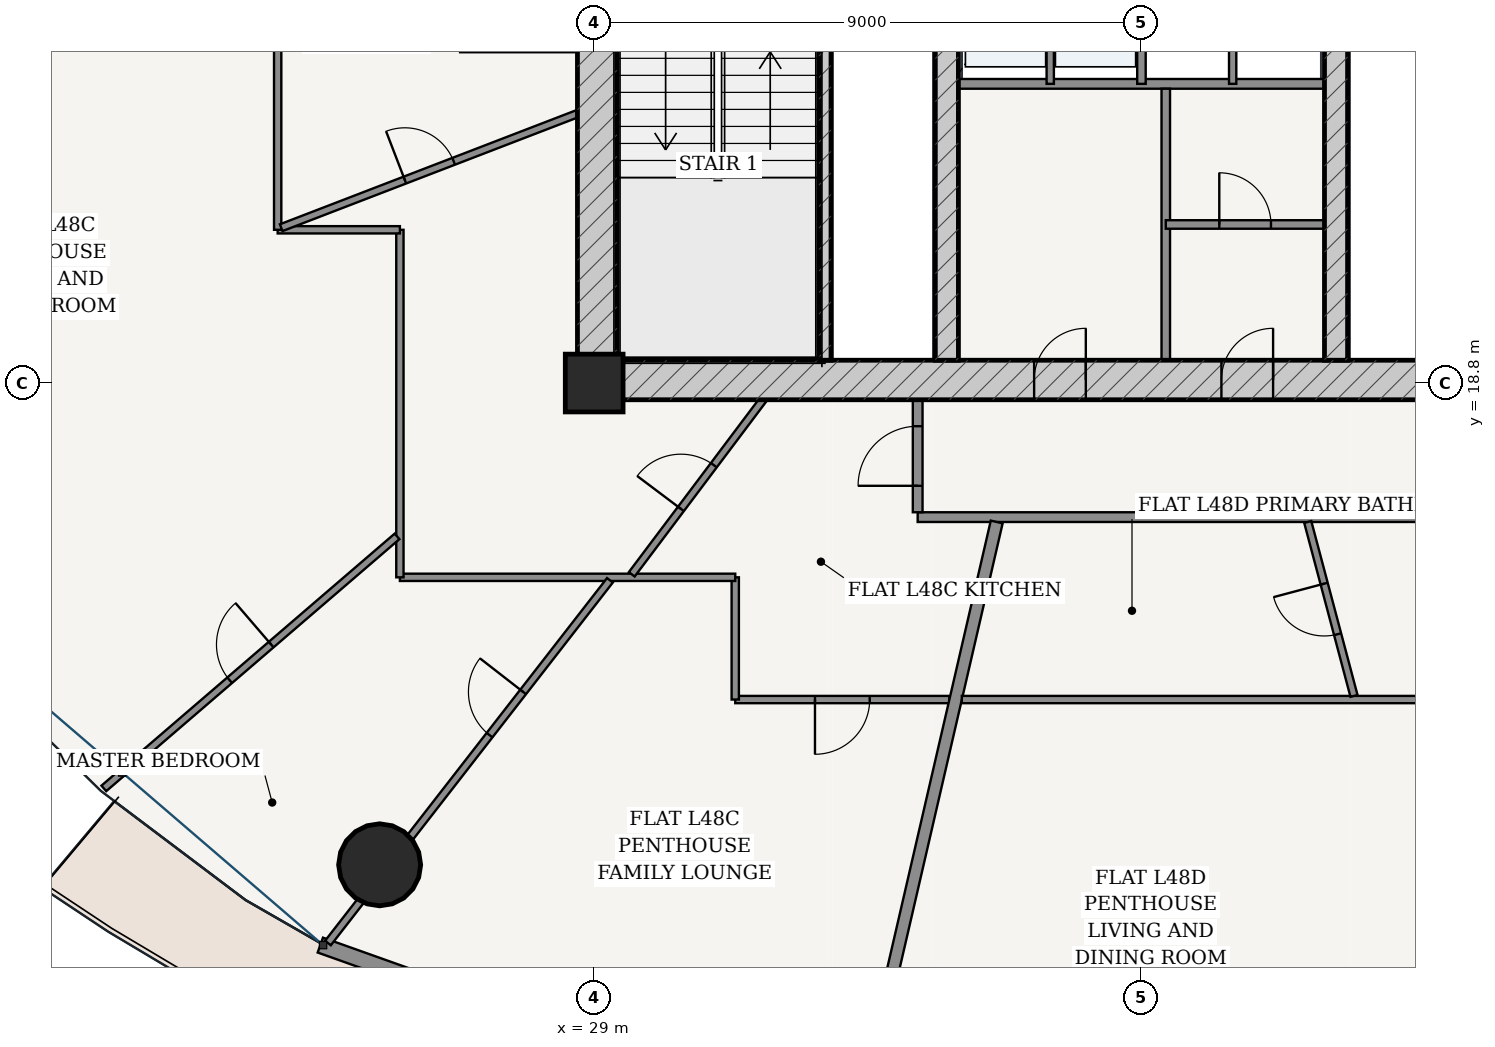
"""IFC4 building model, lengths in metres.
Left out: names, types, materials, properties, quantities, classifications, styles, units other than length and angle.
Written with IfcOpenShell. Run it as: python <this file> out.ifc"""

import sys

from ifc_helpers import new_model, si_unit, direction, frame, frame_2d, origin, origin_2d, place, context, subcontext, project, spatial, rectangle, hollow_circle, extrude, source, transform, mapped, element, fill, save


model = new_model("IFC4")
c1 = context("Model", 3, precision=1e-05, world=origin(), true_north=direction((-0.2419218956, 0.970295726276)))
c2 = subcontext(c1, "Body", "Model", "MODEL_VIEW")
j1 = project(units=[si_unit("LENGTHUNIT", "METRE"), si_unit("PLANEANGLEUNIT", "RADIAN")], contexts=[c1])
p1 = place(None, origin())
s1 = spatial("IfcSite", under=j1, at=p1, CompositionType="ELEMENT")
p2 = place(p1, origin())
s2 = spatial("IfcBuilding", under=s1, at=p2, CompositionType="ELEMENT")
p3 = place(p2, frame((0.0, 0.0, 182.2)))
s3 = spatial("IfcBuildingStorey", under=s2, at=p3, CompositionType="ELEMENT", Elevation=182.2)
p4 = place(p3, frame((29.0, 18.8, 0.0), z_axis=(0.0, 0.0, 1.0), x_axis=(1.0, 0.0, 0.0)))
e1 = element("IfcColumn", 1, at=p4, inside=s3, PredefinedType="COLUMN", context=c2, shape_type="SweptSolid", body=[
    extrude(rectangle(XDim=0.95, YDim=0.95, at=origin_2d()), origin(), (0.0, 0.0, 1.0), 3.6),
])
p5 = place(p3, frame((28.725, 18.85, 0.0), z_axis=(0.0, 0.0, 1.0), x_axis=(1.0, 0.0, 0.0)))
e2 = element("IfcWall", 2, at=p5, inside=s3, PredefinedType="SHEAR", context=c2, shape_type="SweptSolid", body=[
    extrude(rectangle(XDim=18.55, YDim=0.65, at=frame_2d((9.275, 0.0))), origin(), (0.0, 0.0, 1.0), 3.15),
])
p6 = place(p5, frame((7.51, 0.0, 0.0)))
e3 = element("IfcOpeningElement", 3, at=p6, cuts=e2, PredefinedType="OPENING", context=c2, shape_type="SweptSolid", body=[
    extrude(rectangle(XDim=0.85, YDim=2.1, at=frame_2d((0.425, 1.05))), frame((0.0, 0.335, 0.0), z_axis=(0.0, -1.0, 0.0), x_axis=(1.0, 0.0, 0.0)), (0.0, 0.0, 1.0), 0.67),
])
p7 = place(p5, frame((10.59, 0.0, 0.0)))
e4 = element("IfcOpeningElement", 4, at=p7, cuts=e2, PredefinedType="OPENING", context=c2, shape_type="SweptSolid", body=[
    extrude(rectangle(XDim=0.85, YDim=2.1, at=frame_2d((0.425, 1.05))), frame((0.0, 0.335, 0.0), z_axis=(0.0, -1.0, 0.0), x_axis=(1.0, 0.0, 0.0)), (0.0, 0.0, 1.0), 0.67),
])
p8 = place(p3, frame((29.05, 19.175, 0.0), z_axis=(0.0, 0.0, 1.0), x_axis=(0.0, 1.0, 0.0)))
e5 = element("IfcWall", 5, at=p8, inside=s3, PredefinedType="SHEAR", context=c2, shape_type="SweptSolid", body=[
    extrude(rectangle(XDim=15.25, YDim=0.65, at=frame_2d((7.625, 0.0))), origin(), (0.0, 0.0, 1.0), 3.15),
])
p9 = place(p8, frame((9.875, 0.0, 0.0)))
e6 = element("IfcOpeningElement", 6, at=p9, cuts=e5, PredefinedType="OPENING", context=c2, shape_type="SweptSolid", body=[
    extrude(rectangle(XDim=1.5, YDim=2.2, at=frame_2d((0.75, 1.1))), frame((0.0, 0.335, 0.0), z_axis=(0.0, -1.0, 0.0), x_axis=(1.0, 0.0, 0.0)), (0.0, 0.0, 1.0), 0.67),
])
p10 = place(p3, frame((32.795, 19.175, 0.0), z_axis=(0.0, 0.0, 1.0), x_axis=(0.0, 1.0, 0.0)))
e7 = element("IfcWall", 7, at=p10, inside=s3, PredefinedType="SOLIDWALL", context=c2, shape_type="SweptSolid", body=[
    extrude(rectangle(XDim=7.375, YDim=0.2, at=frame_2d((3.688, 0.0))), origin(), (0.0, 0.0, 1.0), 3.15),
])
p11 = place(p3, frame((34.8, 19.175, 0.0), z_axis=(0.0, 0.0, 1.0), x_axis=(0.0, 1.0, 0.0)))
e8 = element("IfcWall", 8, at=p11, inside=s3, PredefinedType="SHEAR", context=c2, shape_type="SweptSolid", body=[
    extrude(rectangle(XDim=15.25, YDim=0.38, at=frame_2d((7.625, 0.0))), origin(), (0.0, 0.0, 1.0), 3.15),
])
p12 = place(p11, frame((7.8, 0.0, 0.0)))
e9 = element("IfcOpeningElement", 9, at=p12, cuts=e8, PredefinedType="OPENING", context=c2, shape_type="SweptSolid", body=[
    extrude(rectangle(XDim=1.05, YDim=2.15, at=frame_2d((0.525, 1.075))), frame((0.0, 0.2, 0.0), z_axis=(0.0, -1.0, 0.0), x_axis=(1.0, 0.0, 0.0)), (0.0, 0.0, 1.0), 0.4),
])
p13 = place(p3, frame((41.2, 19.175, 0.0), z_axis=(0.0, 0.0, 1.0), x_axis=(0.0, 1.0, 0.0)))
e10 = element("IfcWall", 10, at=p13, inside=s3, PredefinedType="SHEAR", context=c2, shape_type="SweptSolid", body=[
    extrude(rectangle(XDim=15.25, YDim=0.38, at=frame_2d((7.625, 0.0))), origin(), (0.0, 0.0, 1.0), 3.15),
])
p14 = place(p13, frame((7.8, 0.0, 0.0)))
e11 = element("IfcOpeningElement", 11, at=p14, cuts=e10, PredefinedType="OPENING", context=c2, shape_type="SweptSolid", body=[
    extrude(rectangle(XDim=1.05, YDim=2.15, at=frame_2d((0.525, 1.075))), frame((0.0, 0.2, 0.0), z_axis=(0.0, -1.0, 0.0), x_axis=(1.0, 0.0, 0.0)), (0.0, 0.0, 1.0), 0.4),
])
p15 = place(p3, frame((25.472, 10.877, 0.0), z_axis=(0.0, 0.0, 1.0), x_axis=(1.0, 0.0, 0.0)))
e12 = element("IfcColumn", 12, at=p15, inside=s3, PredefinedType="COLUMN", context=c2, shape_type="SweptSolid", body=[
    extrude(hollow_circle(Radius=0.675, WallThickness=0.042, at=origin_2d()), origin(), (0.0, 0.0, 1.0), 3.6),
])
p16 = place(p3, frame((24.497, 9.557, 0.0), z_axis=(0.0, 0.0, 1.0), x_axis=(0.942103604331, -0.335321932934, 0.0)))
e13 = element("IfcWall", 13, at=p16, inside=s3, PredefinedType="SOLIDWALL", context=c2, shape_type="SweptSolid", body=[
    extrude(rectangle(XDim=9.408, YDim=0.26, at=frame_2d((4.704, 0.0))), origin(), (0.0, 0.0, 1.0), 3.15),
])
p17 = place(p16, frame((4.029, 0.0, 0.0)))
e14 = element("IfcOpeningElement", 14, at=p17, cuts=e13, PredefinedType="OPENING", context=c2, shape_type="SweptSolid", body=[
    extrude(rectangle(XDim=1.35, YDim=2.2, at=frame_2d((0.675, 1.1))), frame((0.0, 0.14, 0.0), z_axis=(0.0, -1.0, 0.0), x_axis=(1.0, 0.0, 0.0)), (0.0, 0.0, 1.0), 0.28),
])
p18 = place(p3, frame((34.99, 23.72, 0.0), z_axis=(0.0, 0.0, 1.0), x_axis=(1.0, 0.0, 0.0)))
e15 = element("IfcWall", 15, at=p18, inside=s3, PredefinedType="PARTITIONING", context=c2, shape_type="SweptSolid", body=[
    extrude(rectangle(XDim=6.02, YDim=0.16, at=frame_2d((3.01, 0.0))), origin(), (0.0, 0.0, 1.0), 3.15),
])
p19 = place(p3, frame((36.5, 23.72, 0.0), z_axis=(0.0, 0.0, 1.0), x_axis=(0.0, 1.0, 0.0)))
e16 = element("IfcWall", 16, at=p19, inside=s3, PredefinedType="PARTITIONING", context=c2, shape_type="SweptSolid", body=[
    extrude(rectangle(XDim=2.56, YDim=0.12, at=frame_2d((1.28, 0.0))), origin(), (0.0, 0.0, 1.0), 3.15),
])
p20 = place(p3, frame((38.0, 23.72, 0.0), z_axis=(0.0, 0.0, 1.0), x_axis=(0.0, 1.0, 0.0)))
e17 = element("IfcWall", 17, at=p20, inside=s3, PredefinedType="PARTITIONING", context=c2, shape_type="SweptSolid", body=[
    extrude(rectangle(XDim=2.56, YDim=0.14, at=frame_2d((1.28, 0.0))), origin(), (0.0, 0.0, 1.0), 3.15),
])
p21 = place(p3, frame((39.5, 23.72, 0.0), z_axis=(0.0, 0.0, 1.0), x_axis=(0.0, 1.0, 0.0)))
e18 = element("IfcWall", 18, at=p21, inside=s3, PredefinedType="PARTITIONING", context=c2, shape_type="SweptSolid", body=[
    extrude(rectangle(XDim=2.56, YDim=0.12, at=frame_2d((1.28, 0.0))), origin(), (0.0, 0.0, 1.0), 3.15),
])
p22 = place(p3, frame((38.4, 19.175, 0.0), z_axis=(0.0, 0.0, 1.0), x_axis=(0.0, 1.0, 0.0)))
e19 = element("IfcWall", 19, at=p22, inside=s3, PredefinedType="PARTITIONING", context=c2, shape_type="SweptSolid", body=[
    extrude(rectangle(XDim=4.465, YDim=0.14, at=frame_2d((2.232, 0.0))), origin(), (0.0, 0.0, 1.0), 3.15),
])
p23 = place(p3, frame((38.4, 21.407, 0.0), z_axis=(0.0, 0.0, 1.0), x_axis=(1.0, 0.0, 0.0)))
e20 = element("IfcWall", 20, at=p23, inside=s3, PredefinedType="PARTITIONING", context=c2, shape_type="SweptSolid", body=[
    extrude(rectangle(XDim=2.61, YDim=0.14, at=frame_2d((1.305, 0.0))), origin(), (0.0, 0.0, 1.0), 3.15),
])
p24 = place(p23, frame((0.88, 0.0, 0.0)))
e21 = element("IfcOpeningElement", 21, at=p24, cuts=e20, PredefinedType="OPENING", context=c2, shape_type="SweptSolid", body=[
    extrude(rectangle(XDim=0.85, YDim=2.1, at=frame_2d((0.425, 1.05))), frame((0.0, 0.08, 0.0), z_axis=(0.0, -1.0, 0.0), x_axis=(1.0, 0.0, 0.0)), (0.0, 0.0, 1.0), 0.16),
])
p25 = place(p3, frame((34.32, 16.595, 0.0), z_axis=(0.0, 0.0, 1.0), x_axis=(1.0, 0.0, 0.0)))
e22 = element("IfcWall", 22, at=p25, inside=s3, PredefinedType="PARTITIONING", context=c2, shape_type="SweptSolid", body=[
    extrude(rectangle(XDim=14.885, YDim=0.16, at=frame_2d((7.442, 0.0))), origin(), (0.0, 0.0, 1.0), 2.666),
])
p26 = place(p25, frame((10.026, 0.0, 0.0)))
e23 = element("IfcOpeningElement", 23, at=p26, cuts=e22, PredefinedType="OPENING", context=c2, shape_type="SweptSolid", body=[
    extrude(rectangle(XDim=0.98, YDim=2.2, at=frame_2d((0.49, 1.1))), frame((0.0, 0.09, 0.0), z_axis=(0.0, -1.0, 0.0), x_axis=(1.0, 0.0, 0.0)), (0.0, 0.0, 1.0), 0.18),
])
p27 = place(p3, frame((34.32, 16.675, 0.0), z_axis=(0.0, 0.0, 1.0), x_axis=(0.0, 1.0, 0.0)))
e24 = element("IfcWall", 24, at=p27, inside=s3, PredefinedType="PARTITIONING", context=c2, shape_type="SweptSolid", body=[
    extrude(rectangle(XDim=1.85, YDim=0.16, at=frame_2d((0.925, 0.0))), origin(), (0.0, 0.0, 1.0), 3.15),
])
p28 = place(p27, frame((0.435, 0.0, 0.0)))
e25 = element("IfcOpeningElement", 25, at=p28, cuts=e24, PredefinedType="OPENING", context=c2, shape_type="SweptSolid", body=[
    extrude(rectangle(XDim=0.98, YDim=2.2, at=frame_2d((0.49, 1.1))), frame((0.0, 0.09, 0.0), z_axis=(0.0, -1.0, 0.0), x_axis=(1.0, 0.0, 0.0)), (0.0, 0.0, 1.0), 0.18),
])
p29 = place(p3, frame((34.842, 13.595, 0.0), z_axis=(0.0, 0.0, 1.0), x_axis=(-1.0, 0.0, 0.0)))
e26 = element("IfcWall", 26, at=p29, inside=s3, PredefinedType="PARTITIONING", context=c2, shape_type="SweptSolid", body=[
    extrude(rectangle(XDim=3.522, YDim=0.12, at=frame_2d((1.761, 0.0))), origin(), (0.0, 0.0, 1.0), 3.15),
])
p30 = place(p29, frame((1.311, 0.0, 0.0)))
e27 = element("IfcOpeningElement", 27, at=p30, cuts=e26, PredefinedType="OPENING", context=c2, shape_type="SweptSolid", body=[
    extrude(rectangle(XDim=0.9, YDim=2.15, at=frame_2d((0.45, 1.075))), frame((0.0, 0.07, 0.0), z_axis=(0.0, -1.0, 0.0), x_axis=(1.0, 0.0, 0.0)), (0.0, 0.0, 1.0), 0.14),
])
p31 = place(p3, frame((31.32, 13.595, 0.0), z_axis=(0.0, 0.0, 1.0), x_axis=(0.0, 1.0, 0.0)))
e28 = element("IfcWall", 28, at=p31, inside=s3, PredefinedType="PARTITIONING", context=c2, shape_type="SweptSolid", body=[
    extrude(rectangle(XDim=2.01, YDim=0.12, at=frame_2d((1.005, 0.0))), origin(), (0.0, 0.0, 1.0), 2.825),
])
p32 = place(p3, frame((31.32, 15.605, 0.0), z_axis=(0.0, 0.0, 1.0), x_axis=(-1.0, 0.0, 0.0)))
e29 = element("IfcWall", 29, at=p32, inside=s3, PredefinedType="PARTITIONING", context=c2, shape_type="SweptSolid", body=[
    extrude(rectangle(XDim=5.515, YDim=0.12, at=frame_2d((2.758, 0.0))), origin(), (0.0, 0.0, 1.0), 2.666),
])
p33 = place(p3, frame((25.805, 15.605, 0.0), z_axis=(0.0, 0.0, 1.0), x_axis=(0.0, 1.0, 0.0)))
e30 = element("IfcWall", 30, at=p33, inside=s3, PredefinedType="PARTITIONING", context=c2, shape_type="SweptSolid", body=[
    extrude(rectangle(XDim=5.715, YDim=0.12, at=frame_2d((2.857, 0.0))), origin(), (0.0, 0.0, 1.0), 2.666),
])
p34 = place(p3, frame((25.805, 21.32, 0.0), z_axis=(0.0, 0.0, 1.0), x_axis=(-1.0, 0.0, 0.0)))
e31 = element("IfcWall", 31, at=p34, inside=s3, PredefinedType="PARTITIONING", context=c2, shape_type="SweptSolid", body=[
    extrude(rectangle(XDim=2.01, YDim=0.12, at=frame_2d((1.005, 0.0))), origin(), (0.0, 0.0, 1.0), 2.825),
])
p35 = place(p3, frame((23.795, 21.32, 0.0), z_axis=(0.0, 0.0, 1.0), x_axis=(0.0, 1.0, 0.0)))
e32 = element("IfcWall", 32, at=p35, inside=s3, PredefinedType="PARTITIONING", context=c2, shape_type="SweptSolid", body=[
    extrude(rectangle(XDim=5.378, YDim=0.12, at=frame_2d((2.689, 0.0))), origin(), (0.0, 0.0, 1.0), 2.666),
])
p36 = place(p3, frame((25.758, 16.278, 0.0), z_axis=(0.0, 0.0, 1.0), x_axis=(-0.758374994665, -0.651818508073, 0.0)))
e33 = element("IfcWall", 33, at=p36, inside=s3, PredefinedType="PARTITIONING", context=c2, shape_type="SweptSolid", body=[
    extrude(rectangle(XDim=6.358, YDim=0.12, at=frame_2d((3.179, 0.0))), origin(), (0.0, 0.0, 1.0), 2.666),
])
p37 = place(p36, frame((2.729, 0.0, 0.0)))
e34 = element("IfcOpeningElement", 34, at=p37, cuts=e33, PredefinedType="OPENING", context=c2, shape_type="SweptSolid", body=[
    extrude(rectangle(XDim=0.9, YDim=2.15, at=frame_2d((0.45, 1.075))), frame((0.0, 0.07, 0.0), z_axis=(0.0, -1.0, 0.0), x_axis=(1.0, 0.0, 0.0)), (0.0, 0.0, 1.0), 0.14),
])
p38 = place(p3, frame((29.259, 15.556, 0.0), z_axis=(0.0, 0.0, 1.0), x_axis=(-0.61375493029, -0.789496602617, 0.0)))
e35 = element("IfcWall", 35, at=p38, inside=s3, PredefinedType="PARTITIONING", context=c2, shape_type="SweptSolid", body=[
    extrude(rectangle(XDim=7.556, YDim=0.12, at=frame_2d((3.778, 0.0))), origin(), (0.0, 0.0, 1.0), 2.5),
])
p39 = place(p38, frame((2.325, 0.0, 0.0)))
e36 = element("IfcOpeningElement", 36, at=p39, cuts=e35, PredefinedType="OPENING", context=c2, shape_type="SweptSolid", body=[
    extrude(rectangle(XDim=0.9, YDim=2.15, at=frame_2d((0.45, 1.075))), frame((0.0, 0.07, 0.0), z_axis=(0.0, -1.0, 0.0), x_axis=(1.0, 0.0, 0.0)), (0.0, 0.0, 1.0), 0.14),
])
p40 = place(p3, frame((28.723, 23.229, 0.0), z_axis=(0.0, 0.0, 1.0), x_axis=(-0.933262385607, -0.359195378048, 0.0)))
e37 = element("IfcWall", 37, at=p40, inside=s3, PredefinedType="PARTITIONING", context=c2, shape_type="SweptSolid", body=[
    extrude(rectangle(XDim=5.219, YDim=0.12, at=frame_2d((2.609, 0.0))), origin(), (0.0, 0.0, 1.0), 2.825),
])
p41 = place(p40, frame((2.179, 0.0, 0.0)))
e38 = element("IfcOpeningElement", 38, at=p41, cuts=e37, PredefinedType="OPENING", context=c2, shape_type="SweptSolid", body=[
    extrude(rectangle(XDim=0.86, YDim=2.15, at=frame_2d((0.43, 1.075))), frame((0.0, 0.07, 0.0), z_axis=(0.0, -1.0, 0.0), x_axis=(1.0, 0.0, 0.0)), (0.0, 0.0, 1.0), 0.14),
])
p42 = place(p3, frame((31.777, 18.525, 0.0), z_axis=(0.0, 0.0, 1.0), x_axis=(-0.601054484551, -0.799208049635, 0.0)))
e39 = element("IfcWall", 39, at=p42, inside=s3, PredefinedType="PARTITIONING", context=c2, shape_type="SweptSolid", body=[
    extrude(rectangle(XDim=3.592, YDim=0.12, at=frame_2d((1.796, 0.0))), origin(), (0.0, 0.0, 1.0), 3.15),
])
p43 = place(p42, frame((1.346, 0.0, 0.0)))
e40 = element("IfcOpeningElement", 40, at=p43, cuts=e39, PredefinedType="OPENING", context=c2, shape_type="SweptSolid", body=[
    extrude(rectangle(XDim=0.9, YDim=2.15, at=frame_2d((0.45, 1.075))), frame((0.0, 0.07, 0.0), z_axis=(0.0, -1.0, 0.0), x_axis=(1.0, 0.0, 0.0)), (0.0, 0.0, 1.0), 0.14),
])
p44 = place(p3, frame((35.62, 16.515, 0.0), z_axis=(0.0, 0.0, 1.0), x_axis=(-0.225473598067, -0.974249278457, 0.0)))
e41 = element("IfcWall", 41, at=p44, inside=s3, PredefinedType="PARTITIONING", context=c2, shape_type="SweptSolid", body=[
    extrude(rectangle(XDim=10.278, YDim=0.2, at=frame_2d((5.139, 0.0))), origin(), (0.0, 0.0, 1.0), 2.5),
])
p45 = place(p3, frame((52.205, 13.595, 0.0), z_axis=(0.0, 0.0, 1.0), x_axis=(-1.0, 0.0, 0.0)))
e42 = element("IfcWall", 42, at=p45, inside=s3, PredefinedType="PARTITIONING", context=c2, shape_type="SweptSolid", body=[
    extrude(rectangle(XDim=17.159, YDim=0.12, at=frame_2d((8.58, 0.0))), origin(), (0.0, 0.0, 1.0), 2.666),
])
p46 = place(p45, frame((6.879, 0.0, 0.0)))
e43 = element("IfcOpeningElement", 43, at=p46, cuts=e42, PredefinedType="OPENING", context=c2, shape_type="SweptSolid", body=[
    extrude(rectangle(XDim=0.9, YDim=2.15, at=frame_2d((0.45, 1.075))), frame((0.0, 0.07, 0.0), z_axis=(0.0, -1.0, 0.0), x_axis=(1.0, 0.0, 0.0)), (0.0, 0.0, 1.0), 0.14),
])
p47 = place(p45, frame((1.64, 0.0, 0.0)))
e44 = element("IfcOpeningElement", 44, at=p47, cuts=e42, PredefinedType="OPENING", context=c2, shape_type="SweptSolid", body=[
    extrude(rectangle(XDim=0.9, YDim=2.15, at=frame_2d((0.45, 1.075))), frame((0.0, 0.07, 0.0), z_axis=(0.0, -1.0, 0.0), x_axis=(1.0, 0.0, 0.0)), (0.0, 0.0, 1.0), 0.14),
])
p48 = place(p3, frame((40.735, 16.515, 0.0), z_axis=(0.0, 0.0, 1.0), x_axis=(0.256989915822, -0.966414084731, 0.0)))
e45 = element("IfcWall", 45, at=p48, inside=s3, PredefinedType="PARTITIONING", context=c2, shape_type="SweptSolid", body=[
    extrude(rectangle(XDim=2.959, YDim=0.12, at=frame_2d((1.479, 0.0))), origin(), (0.0, 0.0, 1.0), 2.825),
])
p49 = place(p48, frame((1.05, 0.0, 0.0)))
e46 = element("IfcOpeningElement", 46, at=p49, cuts=e45, PredefinedType="OPENING", context=c2, shape_type="SweptSolid", body=[
    extrude(rectangle(XDim=0.86, YDim=2.15, at=frame_2d((0.43, 1.075))), frame((0.0, 0.07, 0.0), z_axis=(0.0, -1.0, 0.0), x_axis=(1.0, 0.0, 0.0)), (0.0, 0.0, 1.0), 0.14),
])
m1 = source(origin(), c2, "Body", "SweptSolid", [
    extrude(rectangle(XDim=0.85, YDim=2.1, at=frame_2d((0.425, 1.05))), frame((0.0, 0.025, 0.0), z_axis=(0.0, -1.0, 0.0), x_axis=(1.0, 0.0, 0.0)), (0.0, 0.0, 1.0), 0.05),
])
p50 = place(p6, origin())
e47 = element("IfcDoor", 47, at=p50, inside=s3, OperationType="SINGLE_SWING_RIGHT", PredefinedType="DOOR", context=c2, shape_type="MappedRepresentation", body=[
    mapped(m1, transform((0.0, 0.0, 0.0), scale=1.0)),
])
fill(e3, e47)
p51 = place(p7, origin())
e48 = element("IfcDoor", 48, at=p51, inside=s3, OperationType="SINGLE_SWING_RIGHT", PredefinedType="DOOR", context=c2, shape_type="MappedRepresentation", body=[
    mapped(m1, transform((0.0, 0.0, 0.0), scale=1.0)),
])
fill(e4, e48)
p52 = place(p24, origin())
e49 = element("IfcDoor", 49, at=p52, inside=s3, OperationType="SINGLE_SWING_LEFT", PredefinedType="DOOR", context=c2, shape_type="MappedRepresentation", body=[
    mapped(m1, transform((0.0, 0.0, 0.0), scale=1.0)),
])
fill(e21, e49)
m2 = source(origin(), c2, "Body", "SweptSolid", [
    extrude(rectangle(XDim=0.98, YDim=2.2, at=frame_2d((0.49, 1.1))), frame((0.0, 0.025, 0.0), z_axis=(0.0, -1.0, 0.0), x_axis=(1.0, 0.0, 0.0)), (0.0, 0.0, 1.0), 0.05),
])
p53 = place(p28, origin())
e50 = element("IfcDoor", 50, at=p53, inside=s3, OperationType="SINGLE_SWING_LEFT", PredefinedType="DOOR", context=c2, shape_type="MappedRepresentation", body=[
    mapped(m2, transform((0.0, 0.0, 0.0), scale=1.0)),
])
fill(e25, e50)
m3 = source(origin(), c2, "Body", "SweptSolid", [
    extrude(rectangle(XDim=0.9, YDim=2.15, at=frame_2d((0.45, 1.075))), frame((0.0, 0.025, 0.0), z_axis=(0.0, -1.0, 0.0), x_axis=(1.0, 0.0, 0.0)), (0.0, 0.0, 1.0), 0.05),
])
p54 = place(p30, origin())
e51 = element("IfcDoor", 51, at=p54, inside=s3, OperationType="SINGLE_SWING_RIGHT", PredefinedType="DOOR", context=c2, shape_type="MappedRepresentation", body=[
    mapped(m3, transform((0.0, 0.0, 0.0), scale=1.0)),
])
fill(e27, e51)
p55 = place(p43, frame((0.9, 0.0, 0.0), z_axis=(0.0, 0.0, 1.0), x_axis=(-1.0, 0.0, 0.0)))
e52 = element("IfcDoor", 52, at=p55, inside=s3, OperationType="SINGLE_SWING_LEFT", PredefinedType="DOOR", context=c2, shape_type="MappedRepresentation", body=[
    mapped(m3, transform((0.0, 0.0, 0.0), scale=1.0)),
])
fill(e40, e52)
p56 = place(p39, frame((0.9, 0.0, 0.0), z_axis=(0.0, 0.0, 1.0), x_axis=(-1.0, 0.0, 0.0)))
e53 = element("IfcDoor", 53, at=p56, inside=s3, OperationType="SINGLE_SWING_RIGHT", PredefinedType="DOOR", context=c2, shape_type="MappedRepresentation", body=[
    mapped(m3, transform((0.0, 0.0, 0.0), scale=1.0)),
])
fill(e36, e53)
m4 = source(origin(), c2, "Body", "SweptSolid", [
    extrude(rectangle(XDim=0.86, YDim=2.15, at=frame_2d((0.43, 1.075))), frame((0.0, 0.025, 0.0), z_axis=(0.0, -1.0, 0.0), x_axis=(1.0, 0.0, 0.0)), (0.0, 0.0, 1.0), 0.05),
])
p57 = place(p41, frame((0.86, 0.0, 0.0), z_axis=(0.0, 0.0, 1.0), x_axis=(-1.0, 0.0, 0.0)))
e54 = element("IfcDoor", 54, at=p57, inside=s3, OperationType="SINGLE_SWING_LEFT", PredefinedType="DOOR", context=c2, shape_type="MappedRepresentation", body=[
    mapped(m4, transform((0.0, 0.0, 0.0), scale=1.0)),
])
fill(e38, e54)
p58 = place(p37, frame((0.9, 0.0, 0.0), z_axis=(0.0, 0.0, 1.0), x_axis=(-1.0, 0.0, 0.0)))
e55 = element("IfcDoor", 55, at=p58, inside=s3, OperationType="SINGLE_SWING_RIGHT", PredefinedType="DOOR", context=c2, shape_type="MappedRepresentation", body=[
    mapped(m3, transform((0.0, 0.0, 0.0), scale=1.0)),
])
fill(e34, e55)
p59 = place(p49, frame((0.86, 0.0, 0.0), z_axis=(0.0, 0.0, 1.0), x_axis=(-1.0, 0.0, 0.0)))
e56 = element("IfcDoor", 56, at=p59, inside=s3, OperationType="SINGLE_SWING_RIGHT", PredefinedType="DOOR", context=c2, shape_type="MappedRepresentation", body=[
    mapped(m4, transform((0.0, 0.0, 0.0), scale=1.0)),
])
fill(e46, e56)
save(model, sys.argv[1])
